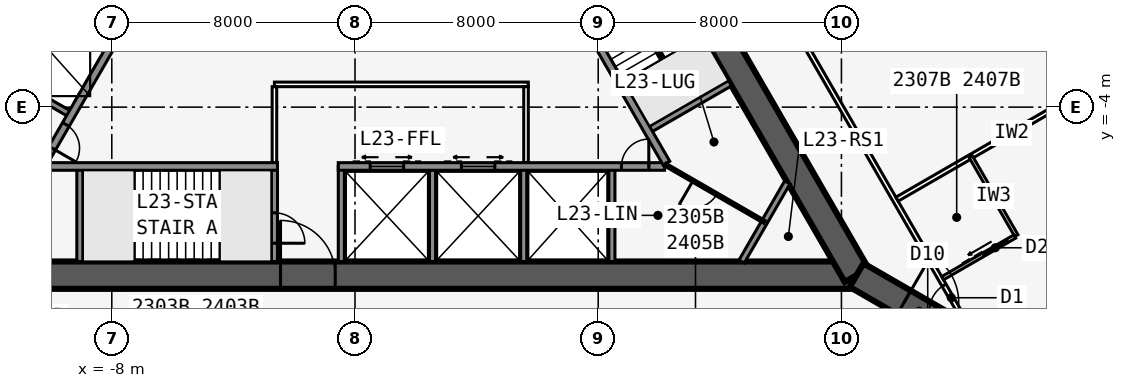
"""IFC4 building model, lengths in metres.
Left out: names, types, materials, properties, quantities, classifications, styles, units other than length and angle.
Written with IfcOpenShell. Run it as: python <this file> out.ifc"""

import sys

from ifc_helpers import new_model, si_unit, direction, frame, frame_2d, origin, place, context, subcontext, project, spatial, rectangle, extrude, element, fill, save


model = new_model("IFC4")
c1 = context("Model", 3, precision=1e-05, world=origin(), true_north=direction((0.0, 1.0)))
c2 = subcontext(c1, "Body", "Model", "MODEL_VIEW")
j1 = project(units=[si_unit("LENGTHUNIT", "METRE"), si_unit("PLANEANGLEUNIT", "RADIAN")], contexts=[c1])
p1 = place(None, origin())
s1 = spatial("IfcSite", under=j1, at=p1, CompositionType="ELEMENT")
p2 = place(p1, origin())
s2 = spatial("IfcBuilding", under=s1, at=p2, CompositionType="ELEMENT")
p3 = place(p2, frame((0.0, 0.0, 89.7)))
s3 = spatial("IfcBuildingStorey", under=s2, at=p3, CompositionType="ELEMENT", Elevation=89.7)
p4 = place(p3, frame((-16.5, -9.526, 0.0), z_axis=(0.0, 0.0, 1.0), x_axis=(1.0, 0.0, 0.0)))
e1 = element("IfcWall", 1, at=p4, inside=s3, PredefinedType="SHEAR", context=c2, shape_type="SweptSolid", body=[
    extrude(rectangle(XDim=33.0, YDim=0.9, at=frame_2d((16.5, 0.0))), origin(), (0.0, 0.0, 1.0), 3.4),
])
p5 = place(p4, frame((14.05, 0.0, 0.0)))
e2 = element("IfcOpeningElement", 2, at=p5, cuts=e1, PredefinedType="OPENING", context=c2, shape_type="SweptSolid", body=[
    extrude(rectangle(XDim=1.8, YDim=2.13, at=frame_2d((0.9, 1.065))), frame((0.0, 0.46, 0.0), z_axis=(0.0, -1.0, 0.0), x_axis=(1.0, 0.0, 0.0)), (0.0, 0.0, 1.0), 0.92),
])
p6 = place(p3, frame((-10.183, -5.951, 0.0), z_axis=(0.0, 0.0, 1.0), x_axis=(1.0, 0.0, 0.0)))
e3 = element("IfcWall", 3, at=p6, inside=s3, PredefinedType="SOLIDWALL", context=c2, shape_type="SweptSolid", body=[
    extrude(rectangle(XDim=7.633, YDim=0.25, at=frame_2d((3.816, 0.0))), origin(), (0.0, 0.0, 1.0), 3.235),
])
p7 = place(p3, frame((-0.55, -5.951, 0.0), z_axis=(0.0, 0.0, 1.0), x_axis=(1.0, 0.0, 0.0)))
e4 = element("IfcWall", 4, at=p7, inside=s3, PredefinedType="SOLIDWALL", context=c2, shape_type="SweptSolid", body=[
    extrude(rectangle(XDim=10.733, YDim=0.25, at=frame_2d((5.366, 0.0))), origin(), (0.0, 0.0, 1.0), 3.235),
])
p8 = place(p7, frame((9.314, 0.0, 0.0)))
e5 = element("IfcOpeningElement", 5, at=p8, cuts=e4, PredefinedType="OPENING", context=c2, shape_type="SweptSolid", body=[
    extrude(rectangle(XDim=0.9, YDim=2.13, at=frame_2d((0.45, 1.065))), frame((0.0, 0.135, 0.0), z_axis=(0.0, -1.0, 0.0), x_axis=(1.0, 0.0, 0.0)), (0.0, 0.0, 1.0), 0.27),
])
p9 = place(p7, frame((1.05, 0.0, 0.0)))
e6 = element("IfcOpeningElement", 6, at=p9, cuts=e4, PredefinedType="OPENING", context=c2, shape_type="SweptSolid", body=[
    extrude(rectangle(XDim=1.1, YDim=2.13, at=frame_2d((0.55, 1.065))), frame((0.0, 0.135, 0.0), z_axis=(0.0, -1.0, 0.0), x_axis=(1.0, 0.0, 0.0)), (0.0, 0.0, 1.0), 0.27),
])
p10 = place(p7, frame((4.05, 0.0, 0.0)))
e7 = element("IfcOpeningElement", 7, at=p10, cuts=e4, PredefinedType="OPENING", context=c2, shape_type="SweptSolid", body=[
    extrude(rectangle(XDim=1.1, YDim=2.13, at=frame_2d((0.55, 1.065))), frame((0.0, 0.135, 0.0), z_axis=(0.0, -1.0, 0.0), x_axis=(1.0, 0.0, 0.0)), (0.0, 0.0, 1.0), 0.27),
])
p11 = place(p3, frame((-9.05, -5.951, 0.0), z_axis=(0.0, 0.0, 1.0), x_axis=(0.0, -1.0, 0.0)))
e8 = element("IfcWall", 8, at=p11, inside=s3, PredefinedType="SOLIDWALL", context=c2, shape_type="SweptSolid", body=[
    extrude(rectangle(XDim=3.125, YDim=0.2, at=frame_2d((1.562, 0.0))), origin(), (0.0, 0.0, 1.0), 3.235),
])
p12 = place(p3, frame((-2.65, -5.951, 0.0), z_axis=(0.0, 0.0, 1.0), x_axis=(0.0, -1.0, 0.0)))
e9 = element("IfcWall", 9, at=p12, inside=s3, PredefinedType="SOLIDWALL", context=c2, shape_type="SweptSolid", body=[
    extrude(rectangle(XDim=3.125, YDim=0.2, at=frame_2d((1.562, 0.0))), origin(), (0.0, 0.0, 1.0), 3.235),
])
p13 = place(p12, frame((1.525, 0.0, 0.0)))
e10 = element("IfcOpeningElement", 10, at=p13, cuts=e9, PredefinedType="OPENING", context=c2, shape_type="SweptSolid", body=[
    extrude(rectangle(XDim=1.0, YDim=2.13, at=frame_2d((0.5, 1.065))), frame((0.0, 0.11, 0.0), z_axis=(0.0, -1.0, 0.0), x_axis=(1.0, 0.0, 0.0)), (0.0, 0.0, 1.0), 0.22),
])
for number, where, z_axis, x_axis in (
    (11, (-0.45, -5.951, 0.0), (0.0, 0.0, 1.0), (0.0, -1.0, 0.0)),
    (12, (2.55, -5.951, 0.0), (0.0, 0.0, 1.0), (0.0, -1.0, 0.0)),
    (13, (5.55, -5.951, 0.0), (0.0, 0.0, 1.0), (0.0, -1.0, 0.0)),
    (14, (8.45, -5.951, 0.0), (0.0, 0.0, 1.0), (0.0, -1.0, 0.0)),
):
    element("IfcWall", number, at=place(p3, frame(where, z_axis=z_axis, x_axis=x_axis)), inside=s3, PredefinedType="SOLIDWALL", context=c2, shape_type="SweptSolid", body=[
        extrude(rectangle(XDim=3.125, YDim=0.2, at=frame_2d((1.562, 0.0))), origin(), (0.0, 0.0, 1.0), 3.235),
    ])
p14 = place(p3, frame((16.5, -9.526, 0.0), z_axis=(0.0, 0.0, 1.0), x_axis=(-0.499999749417, 0.866025548458, 0.0)))
e15 = element("IfcWall", 15, at=p14, inside=s3, PredefinedType="SHEAR", context=c2, shape_type="SweptSolid", body=[
    extrude(rectangle(XDim=33.0, YDim=0.9, at=frame_2d((16.5, 0.0))), origin(), (0.0, 0.0, 1.0), 3.4),
])
p15 = place(p14, frame((14.15, 0.0, 0.0)))
e16 = element("IfcOpeningElement", 16, at=p15, cuts=e15, PredefinedType="OPENING", context=c2, shape_type="SweptSolid", body=[
    extrude(rectangle(XDim=1.8, YDim=2.13, at=frame_2d((0.9, 1.065))), frame((0.0, 0.46, 0.0), z_axis=(0.0, -1.0, 0.0), x_axis=(1.0, 0.0, 0.0)), (0.0, 0.0, 1.0), 0.92),
])
p16 = place(p14, frame((12.6, 0.0, 0.0)))
e17 = element("IfcOpeningElement", 17, at=p16, cuts=e15, PredefinedType="OPENING", context=c2, shape_type="SweptSolid", body=[
    extrude(rectangle(XDim=1.0, YDim=2.13, at=frame_2d((0.5, 1.065))), frame((0.0, 0.46, 0.0), z_axis=(0.0, -1.0, 0.0), x_axis=(1.0, 0.0, 0.0)), (0.0, 0.0, 1.0), 0.92),
])
p17 = place(p3, frame((10.245, -5.843, 0.0), z_axis=(0.0, 0.0, 1.0), x_axis=(-0.499993009313, 0.866029439822, 0.0)))
e18 = element("IfcWall", 18, at=p17, inside=s3, PredefinedType="SOLIDWALL", context=c2, shape_type="SweptSolid", body=[
    extrude(rectangle(XDim=7.733, YDim=0.25, at=frame_2d((3.866, 0.0))), origin(), (0.0, 0.0, 1.0), 3.235),
])
p18 = place(p3, frame((9.629, -4.775, 0.0), z_axis=(0.0, 0.0, 1.0), x_axis=(0.866022959057, 0.500004234368, 0.0)))
e19 = element("IfcWall", 19, at=p18, inside=s3, PredefinedType="SOLIDWALL", context=c2, shape_type="SweptSolid", body=[
    extrude(rectangle(XDim=3.125, YDim=0.2, at=frame_2d((1.562, 0.0))), origin(), (0.0, 0.0, 1.0), 3.235),
])
p19 = place(p3, frame((0.0, 19.052, 0.0), z_axis=(0.0, 0.0, 1.0), x_axis=(-0.499999749417, -0.866025548458, 0.0)))
e20 = element("IfcWall", 20, at=p19, inside=s3, PredefinedType="SHEAR", context=c2, shape_type="SweptSolid", body=[
    extrude(rectangle(XDim=33.0, YDim=0.9, at=frame_2d((16.5, 0.0))), origin(), (0.0, 0.0, 1.0), 3.4),
])
p20 = place(p19, frame((14.15, 0.0, 0.0)))
e21 = element("IfcOpeningElement", 21, at=p20, cuts=e20, PredefinedType="OPENING", context=c2, shape_type="SweptSolid", body=[
    extrude(rectangle(XDim=1.8, YDim=2.13, at=frame_2d((0.9, 1.065))), frame((0.0, 0.46, 0.0), z_axis=(0.0, -1.0, 0.0), x_axis=(1.0, 0.0, 0.0)), (0.0, 0.0, 1.0), 0.92),
])
p21 = place(p19, frame((12.6, 0.0, 0.0)))
e22 = element("IfcOpeningElement", 22, at=p21, cuts=e20, PredefinedType="OPENING", context=c2, shape_type="SweptSolid", body=[
    extrude(rectangle(XDim=1.0, YDim=2.13, at=frame_2d((0.5, 1.065))), frame((0.0, 0.46, 0.0), z_axis=(0.0, -1.0, 0.0), x_axis=(1.0, 0.0, 0.0)), (0.0, 0.0, 1.0), 0.92),
])
p22 = place(p3, frame((-4.929, 3.365, 0.0), z_axis=(0.0, 0.0, 1.0), x_axis=(-0.499991433582, -0.866030349552, 0.0)))
e23 = element("IfcWall", 23, at=p22, inside=s3, PredefinedType="SOLIDWALL", context=c2, shape_type="SweptSolid", body=[
    extrude(rectangle(XDim=10.633, YDim=0.25, at=frame_2d((5.316, 0.0))), origin(), (0.0, 0.0, 1.0), 3.235),
])
p23 = place(p22, frame((9.164, 0.0, 0.0)))
e24 = element("IfcOpeningElement", 24, at=p23, cuts=e23, PredefinedType="OPENING", context=c2, shape_type="SweptSolid", body=[
    extrude(rectangle(XDim=0.9, YDim=2.13, at=frame_2d((0.45, 1.065))), frame((0.0, 0.135, 0.0), z_axis=(0.0, -1.0, 0.0), x_axis=(1.0, 0.0, 0.0)), (0.0, 0.0, 1.0), 0.27),
])
p24 = place(p3, frame((-9.329, -4.256, 0.0), z_axis=(0.0, 0.0, 1.0), x_axis=(-0.866022959057, 0.500004234368, 0.0)))
e25 = element("IfcWall", 25, at=p24, inside=s3, PredefinedType="SOLIDWALL", context=c2, shape_type="SweptSolid", body=[
    extrude(rectangle(XDim=3.125, YDim=0.2, at=frame_2d((1.562, 0.0))), origin(), (0.0, 0.0, 1.0), 3.235),
])
p25 = place(p3, frame((16.5, -9.526, 0.0), z_axis=(0.0, 0.0, 1.0), x_axis=(0.866031398331, -0.499989616998, 0.0)))
e26 = element("IfcWall", 26, at=p25, inside=s3, PredefinedType="SHEAR", context=c2, shape_type="SweptSolid", body=[
    extrude(rectangle(XDim=4.746, YDim=0.9, at=frame_2d((2.373, 0.0))), origin(), (0.0, 0.0, 1.0), 3.4),
])
p26 = place(p25, frame((1.8, 0.0, 0.0)))
e27 = element("IfcOpeningElement", 27, at=p26, cuts=e26, PredefinedType="OPENING", context=c2, shape_type="SweptSolid", body=[
    extrude(rectangle(XDim=1.8, YDim=2.13, at=frame_2d((0.9, 1.065))), frame((0.0, 0.46, 0.0), z_axis=(0.0, -1.0, 0.0), x_axis=(1.0, 0.0, 0.0)), (0.0, 0.0, 1.0), 0.92),
])
p27 = place(p3, frame((20.027, -10.985, 0.0), z_axis=(0.0, 0.0, 1.0), x_axis=(-0.500001677587, 0.866024435227, 0.0)))
e28 = element("IfcWall", 28, at=p27, inside=s3, PredefinedType="PARTITIONING", context=c2, shape_type="SweptSolid", body=[
    extrude(rectangle(XDim=39.054, YDim=0.15, at=frame_2d((19.527, 0.0))), origin(), (0.0, 0.0, 1.0), 3.235),
])
p28 = place(p27, frame((0.352, 0.0, 0.0)))
e29 = element("IfcOpeningElement", 29, at=p28, cuts=e28, PredefinedType="OPENING", context=c2, shape_type="SweptSolid", body=[
    extrude(rectangle(XDim=0.95, YDim=2.13, at=frame_2d((0.475, 1.065))), frame((0.0, 0.085, 0.0), z_axis=(0.0, -1.0, 0.0), x_axis=(1.0, 0.0, 0.0)), (0.0, 0.0, 1.0), 0.17),
])
p29 = place(p27, frame((10.352, 0.0, 0.0)))
e30 = element("IfcOpeningElement", 30, at=p29, cuts=e28, PredefinedType="OPENING", context=c2, shape_type="SweptSolid", body=[
    extrude(rectangle(XDim=0.95, YDim=2.13, at=frame_2d((0.475, 1.065))), frame((0.0, 0.085, 0.0), z_axis=(0.0, -1.0, 0.0), x_axis=(1.0, 0.0, 0.0)), (0.0, 0.0, 1.0), 0.17),
])
p30 = place(p27, frame((17.752, 0.0, 0.0)))
e31 = element("IfcOpeningElement", 31, at=p30, cuts=e28, PredefinedType="OPENING", context=c2, shape_type="SweptSolid", body=[
    extrude(rectangle(XDim=0.95, YDim=2.13, at=frame_2d((0.475, 1.065))), frame((0.0, 0.085, 0.0), z_axis=(0.0, -1.0, 0.0), x_axis=(1.0, 0.0, 0.0)), (0.0, 0.0, 1.0), 0.17),
])
p31 = place(p27, frame((26.552, 0.0, 0.0)))
e32 = element("IfcOpeningElement", 32, at=p31, cuts=e28, PredefinedType="OPENING", context=c2, shape_type="SweptSolid", body=[
    extrude(rectangle(XDim=0.95, YDim=2.13, at=frame_2d((0.475, 1.065))), frame((0.0, 0.085, 0.0), z_axis=(0.0, -1.0, 0.0), x_axis=(1.0, 0.0, 0.0)), (0.0, 0.0, 1.0), 0.17),
])
p32 = place(p27, frame((37.752, 0.0, 0.0)))
e33 = element("IfcOpeningElement", 33, at=p32, cuts=e28, PredefinedType="OPENING", context=c2, shape_type="SweptSolid", body=[
    extrude(rectangle(XDim=0.95, YDim=2.13, at=frame_2d((0.475, 1.065))), frame((0.0, 0.085, 0.0), z_axis=(0.0, -1.0, 0.0), x_axis=(1.0, 0.0, 0.0)), (0.0, 0.0, 1.0), 0.17),
])
p33 = place(p3, frame((17.829, -7.027, 0.0), z_axis=(0.0, 0.0, 1.0), x_axis=(0.866032659912, 0.499987431809, 0.0)))
e34 = element("IfcWall", 34, at=p33, inside=s3, PredefinedType="PARTITIONING", context=c2, shape_type="SweptSolid", body=[
    extrude(rectangle(XDim=8.72, YDim=0.15, at=frame_2d((4.36, 0.0))), origin(), (0.0, 0.0, 1.0), 2.389),
])
p34 = place(p3, frame((21.753, -8.225, 0.0), z_axis=(0.0, 0.0, 1.0), x_axis=(-0.499990139034, 0.866031096941, 0.0)))
e35 = element("IfcWall", 35, at=p34, inside=s3, PredefinedType="PLUMBINGWALL", context=c2, shape_type="SweptSolid", body=[
    extrude(rectangle(XDim=3.0, YDim=0.12, at=frame_2d((1.5, 0.0))), origin(), (0.0, 0.0, 1.0), 3.235),
])
p35 = place(p3, frame((19.329, -9.625, 0.0), z_axis=(0.0, 0.0, 1.0), x_axis=(0.866035715982, 0.499982138324, 0.0)))
e36 = element("IfcWall", 36, at=p35, inside=s3, PredefinedType="PLUMBINGWALL", context=c2, shape_type="SweptSolid", body=[
    extrude(rectangle(XDim=2.74, YDim=0.12, at=frame_2d((1.37, 0.0))), origin(), (0.0, 0.0, 1.0), 3.235),
])
p36 = place(p35, frame((1.55, 0.0, 0.0)))
e37 = element("IfcOpeningElement", 37, at=p36, cuts=e36, PredefinedType="OPENING", context=c2, shape_type="SweptSolid", body=[
    extrude(rectangle(XDim=0.9, YDim=2.13, at=frame_2d((0.45, 1.065))), frame((0.0, 0.07, 0.0), z_axis=(0.0, -1.0, 0.0), x_axis=(1.0, 0.0, 0.0)), (0.0, 0.0, 1.0), 0.14),
])
p37 = place(p3, frame((-0.5, 22.836, 0.0), z_axis=(0.0, 0.0, 1.0), x_axis=(-0.500001677587, -0.866024435227, 0.0)))
e38 = element("IfcWall", 38, at=p37, inside=s3, PredefinedType="PARTITIONING", context=c2, shape_type="SweptSolid", body=[
    extrude(rectangle(XDim=39.054, YDim=0.15, at=frame_2d((19.527, 0.0))), origin(), (0.0, 0.0, 1.0), 3.235),
])
p38 = place(p37, frame((0.352, 0.0, 0.0)))
e39 = element("IfcOpeningElement", 39, at=p38, cuts=e38, PredefinedType="OPENING", context=c2, shape_type="SweptSolid", body=[
    extrude(rectangle(XDim=0.95, YDim=2.13, at=frame_2d((0.475, 1.065))), frame((0.0, 0.085, 0.0), z_axis=(0.0, -1.0, 0.0), x_axis=(1.0, 0.0, 0.0)), (0.0, 0.0, 1.0), 0.17),
])
p39 = place(p37, frame((6.552, 0.0, 0.0)))
e40 = element("IfcOpeningElement", 40, at=p39, cuts=e38, PredefinedType="OPENING", context=c2, shape_type="SweptSolid", body=[
    extrude(rectangle(XDim=0.95, YDim=2.13, at=frame_2d((0.475, 1.065))), frame((0.0, 0.085, 0.0), z_axis=(0.0, -1.0, 0.0), x_axis=(1.0, 0.0, 0.0)), (0.0, 0.0, 1.0), 0.17),
])
p40 = place(p37, frame((20.352, 0.0, 0.0)))
e41 = element("IfcOpeningElement", 41, at=p40, cuts=e38, PredefinedType="OPENING", context=c2, shape_type="SweptSolid", body=[
    extrude(rectangle(XDim=0.95, YDim=2.13, at=frame_2d((0.475, 1.065))), frame((0.0, 0.085, 0.0), z_axis=(0.0, -1.0, 0.0), x_axis=(1.0, 0.0, 0.0)), (0.0, 0.0, 1.0), 0.17),
])
p41 = place(p37, frame((27.752, 0.0, 0.0)))
e42 = element("IfcOpeningElement", 42, at=p41, cuts=e38, PredefinedType="OPENING", context=c2, shape_type="SweptSolid", body=[
    extrude(rectangle(XDim=0.95, YDim=2.13, at=frame_2d((0.475, 1.065))), frame((0.0, 0.085, 0.0), z_axis=(0.0, -1.0, 0.0), x_axis=(1.0, 0.0, 0.0)), (0.0, 0.0, 1.0), 0.17),
])
p42 = place(p37, frame((37.752, 0.0, 0.0)))
e43 = element("IfcOpeningElement", 43, at=p42, cuts=e38, PredefinedType="OPENING", context=c2, shape_type="SweptSolid", body=[
    extrude(rectangle(XDim=0.95, YDim=2.13, at=frame_2d((0.475, 1.065))), frame((0.0, 0.085, 0.0), z_axis=(0.0, -1.0, 0.0), x_axis=(1.0, 0.0, 0.0)), (0.0, 0.0, 1.0), 0.17),
])
p43 = place(p3, frame((-2.65, -3.251, 0.0), z_axis=(0.0, 0.0, 1.0), x_axis=(1.0, 0.0, 0.0)))
e44 = element("IfcWall", 44, at=p43, inside=s3, PredefinedType="PARTITIONING", context=c2, shape_type="SweptSolid", body=[
    extrude(rectangle(XDim=8.35, YDim=0.15, at=frame_2d((4.175, 0.0))), origin(), (0.0, 0.0, 1.0), 3.235),
])
for number, where, z_axis, x_axis in (
    (45, (-2.65, -5.826, 0.0), (0.0, 0.0, 1.0), (0.0, 1.0, 0.0)),
    (46, (5.625, -5.826, 0.0), (0.0, 0.0, 1.0), (0.0, 1.0, 0.0)),
):
    element("IfcWall", number, at=place(p3, frame(where, z_axis=z_axis, x_axis=x_axis)), inside=s3, PredefinedType="PARTITIONING", context=c2, shape_type="SweptSolid", body=[
        extrude(rectangle(XDim=2.5, YDim=0.15, at=frame_2d((1.25, 0.0))), origin(), (0.0, 0.0, 1.0), 3.235),
    ])
p44 = place(p3, frame((14.219, -6.476, 0.0), z_axis=(0.0, 0.0, 1.0), x_axis=(-0.499952404951, -0.866052881055, 0.0)))
e47 = element("IfcWall", 47, at=p44, inside=s3, PredefinedType="SOLIDWALL", context=c2, shape_type="SweptSolid", body=[
    extrude(rectangle(XDim=3.002, YDim=0.2, at=frame_2d((1.501, 0.0))), origin(), (0.0, 0.0, 1.0), 3.235),
])
p45 = place(p3, frame((13.469, -7.776, 0.0), z_axis=(0.0, 0.0, 1.0), x_axis=(-0.866021898093, 0.500006071987, 0.0)))
e48 = element("IfcWall", 48, at=p45, inside=s3, PredefinedType="PARTITIONING", context=c2, shape_type="SweptSolid", body=[
    extrude(rectangle(XDim=3.775, YDim=0.1, at=frame_2d((1.888, 0.0))), origin(), (0.0, 0.0, 1.0), 3.235),
])
p46 = place(p45, frame((1.815, 0.0, 0.0)))
e49 = element("IfcOpeningElement", 49, at=p46, cuts=e48, PredefinedType="OPENING", context=c2, shape_type="SweptSolid", body=[
    extrude(rectangle(XDim=0.9, YDim=2.13, at=frame_2d((0.45, 1.065))), frame((0.0, 0.06, 0.0), z_axis=(0.0, -1.0, 0.0), x_axis=(1.0, 0.0, 0.0)), (0.0, 0.0, 1.0), 0.12),
])
p47 = place(p3, frame((-7.247, -7.576, 0.0), z_axis=(0.0, 0.0, 1.0), x_axis=(1.0, 0.0, 0.0)))
e50 = element("IfcWall", 50, at=p47, inside=s3, PredefinedType="SOLIDWALL", context=c2, shape_type="SweptSolid", body=[
    extrude(rectangle(XDim=2.794, YDim=0.1, at=frame_2d((1.397, 0.0))), origin(), (0.0, 0.0, 1.0), 3.4),
])
p48 = place(p3, frame((10.135, -2.401, 0.0), z_axis=(0.0, 0.0, 1.0), x_axis=(-0.499992232847, 0.866029888106, 0.0)))
e51 = element("IfcWall", 51, at=p48, inside=s3, PredefinedType="SOLIDWALL", context=c2, shape_type="SweptSolid", body=[
    extrude(rectangle(XDim=2.794, YDim=0.1, at=frame_2d((1.397, 0.0))), origin(), (0.0, 0.0, 1.0), 3.4),
])
p49 = place(p36, origin())
e52 = element("IfcDoor", 52, at=p49, inside=s3, OperationType="SLIDING_TO_LEFT", PredefinedType="DOOR", context=c2, shape_type="SweptSolid", body=[
    extrude(rectangle(XDim=0.9, YDim=2.13, at=frame_2d((0.45, 1.065))), frame((0.0, 0.025, 0.0), z_axis=(0.0, -1.0, 0.0), x_axis=(1.0, 0.0, 0.0)), (0.0, 0.0, 1.0), 0.05),
])
fill(e37, e52)
p50 = place(p28, origin())
e53 = element("IfcDoor", 53, at=p50, inside=s3, OperationType="SINGLE_SWING_LEFT", PredefinedType="DOOR", context=c2, shape_type="SweptSolid", body=[
    extrude(rectangle(XDim=0.95, YDim=2.13, at=frame_2d((0.475, 1.065))), frame((0.0, 0.025, 0.0), z_axis=(0.0, -1.0, 0.0), x_axis=(1.0, 0.0, 0.0)), (0.0, 0.0, 1.0), 0.05),
])
fill(e29, e53)
p51 = place(p5, origin())
e54 = element("IfcDoor", 54, at=p51, inside=s3, OperationType="DOUBLE_DOOR_SINGLE_SWING", PredefinedType="DOOR", context=c2, shape_type="SweptSolid", body=[
    extrude(rectangle(XDim=1.8, YDim=2.13, at=frame_2d((0.9, 1.065))), frame((0.0, 0.025, 0.0), z_axis=(0.0, -1.0, 0.0), x_axis=(1.0, 0.0, 0.0)), (0.0, 0.0, 1.0), 0.05),
])
fill(e2, e54)
p52 = place(p13, origin())
e55 = element("IfcDoor", 55, at=p52, inside=s3, OperationType="SINGLE_SWING_RIGHT", PredefinedType="DOOR", context=c2, shape_type="SweptSolid", body=[
    extrude(rectangle(XDim=1.0, YDim=2.13, at=frame_2d((0.5, 1.065))), frame((0.0, 0.025, 0.0), z_axis=(0.0, -1.0, 0.0), x_axis=(1.0, 0.0, 0.0)), (0.0, 0.0, 1.0), 0.05),
])
fill(e10, e55)
p53 = place(p26, origin())
e56 = element("IfcDoor", 56, at=p53, inside=s3, OperationType="DOUBLE_DOOR_DOUBLE_SWING", PredefinedType="DOOR", context=c2, shape_type="SweptSolid", body=[
    extrude(rectangle(XDim=1.8, YDim=2.13, at=frame_2d((0.9, 1.065))), frame((0.0, 0.025, 0.0), z_axis=(0.0, -1.0, 0.0), x_axis=(1.0, 0.0, 0.0)), (0.0, 0.0, 1.0), 0.05),
])
fill(e27, e56)
p54 = place(p8, origin())
e57 = element("IfcDoor", 57, at=p54, inside=s3, OperationType="SINGLE_SWING_RIGHT", PredefinedType="DOOR", context=c2, shape_type="SweptSolid", body=[
    extrude(rectangle(XDim=0.9, YDim=2.13, at=frame_2d((0.45, 1.065))), frame((0.0, 0.025, 0.0), z_axis=(0.0, -1.0, 0.0), x_axis=(1.0, 0.0, 0.0)), (0.0, 0.0, 1.0), 0.05),
])
fill(e5, e57)
p55 = place(p46, origin())
e58 = element("IfcDoor", 58, at=p55, inside=s3, OperationType="SINGLE_SWING_RIGHT", PredefinedType="DOOR", context=c2, shape_type="SweptSolid", body=[
    extrude(rectangle(XDim=0.9, YDim=2.13, at=frame_2d((0.45, 1.065))), frame((0.0, 0.025, 0.0), z_axis=(0.0, -1.0, 0.0), x_axis=(1.0, 0.0, 0.0)), (0.0, 0.0, 1.0), 0.05),
])
fill(e49, e58)
p56 = place(p23, origin())
e59 = element("IfcDoor", 59, at=p56, inside=s3, OperationType="SINGLE_SWING_RIGHT", PredefinedType="DOOR", context=c2, shape_type="SweptSolid", body=[
    extrude(rectangle(XDim=0.9, YDim=2.13, at=frame_2d((0.45, 1.065))), frame((0.0, 0.025, 0.0), z_axis=(0.0, -1.0, 0.0), x_axis=(1.0, 0.0, 0.0)), (0.0, 0.0, 1.0), 0.05),
])
fill(e24, e59)
p57 = place(p9, origin())
e60 = element("IfcDoor", 60, at=p57, inside=s3, OperationType="DOUBLE_DOOR_SLIDING", PredefinedType="USERDEFINED", context=c2, shape_type="SweptSolid", body=[
    extrude(rectangle(XDim=1.1, YDim=2.13, at=frame_2d((0.55, 1.065))), frame((0.0, 0.025, 0.0), z_axis=(0.0, -1.0, 0.0), x_axis=(1.0, 0.0, 0.0)), (0.0, 0.0, 1.0), 0.05),
])
fill(e6, e60)
p58 = place(p10, origin())
e61 = element("IfcDoor", 61, at=p58, inside=s3, OperationType="DOUBLE_DOOR_SLIDING", PredefinedType="USERDEFINED", context=c2, shape_type="SweptSolid", body=[
    extrude(rectangle(XDim=1.1, YDim=2.13, at=frame_2d((0.55, 1.065))), frame((0.0, 0.025, 0.0), z_axis=(0.0, -1.0, 0.0), x_axis=(1.0, 0.0, 0.0)), (0.0, 0.0, 1.0), 0.05),
])
fill(e7, e61)
save(model, sys.argv[1])
